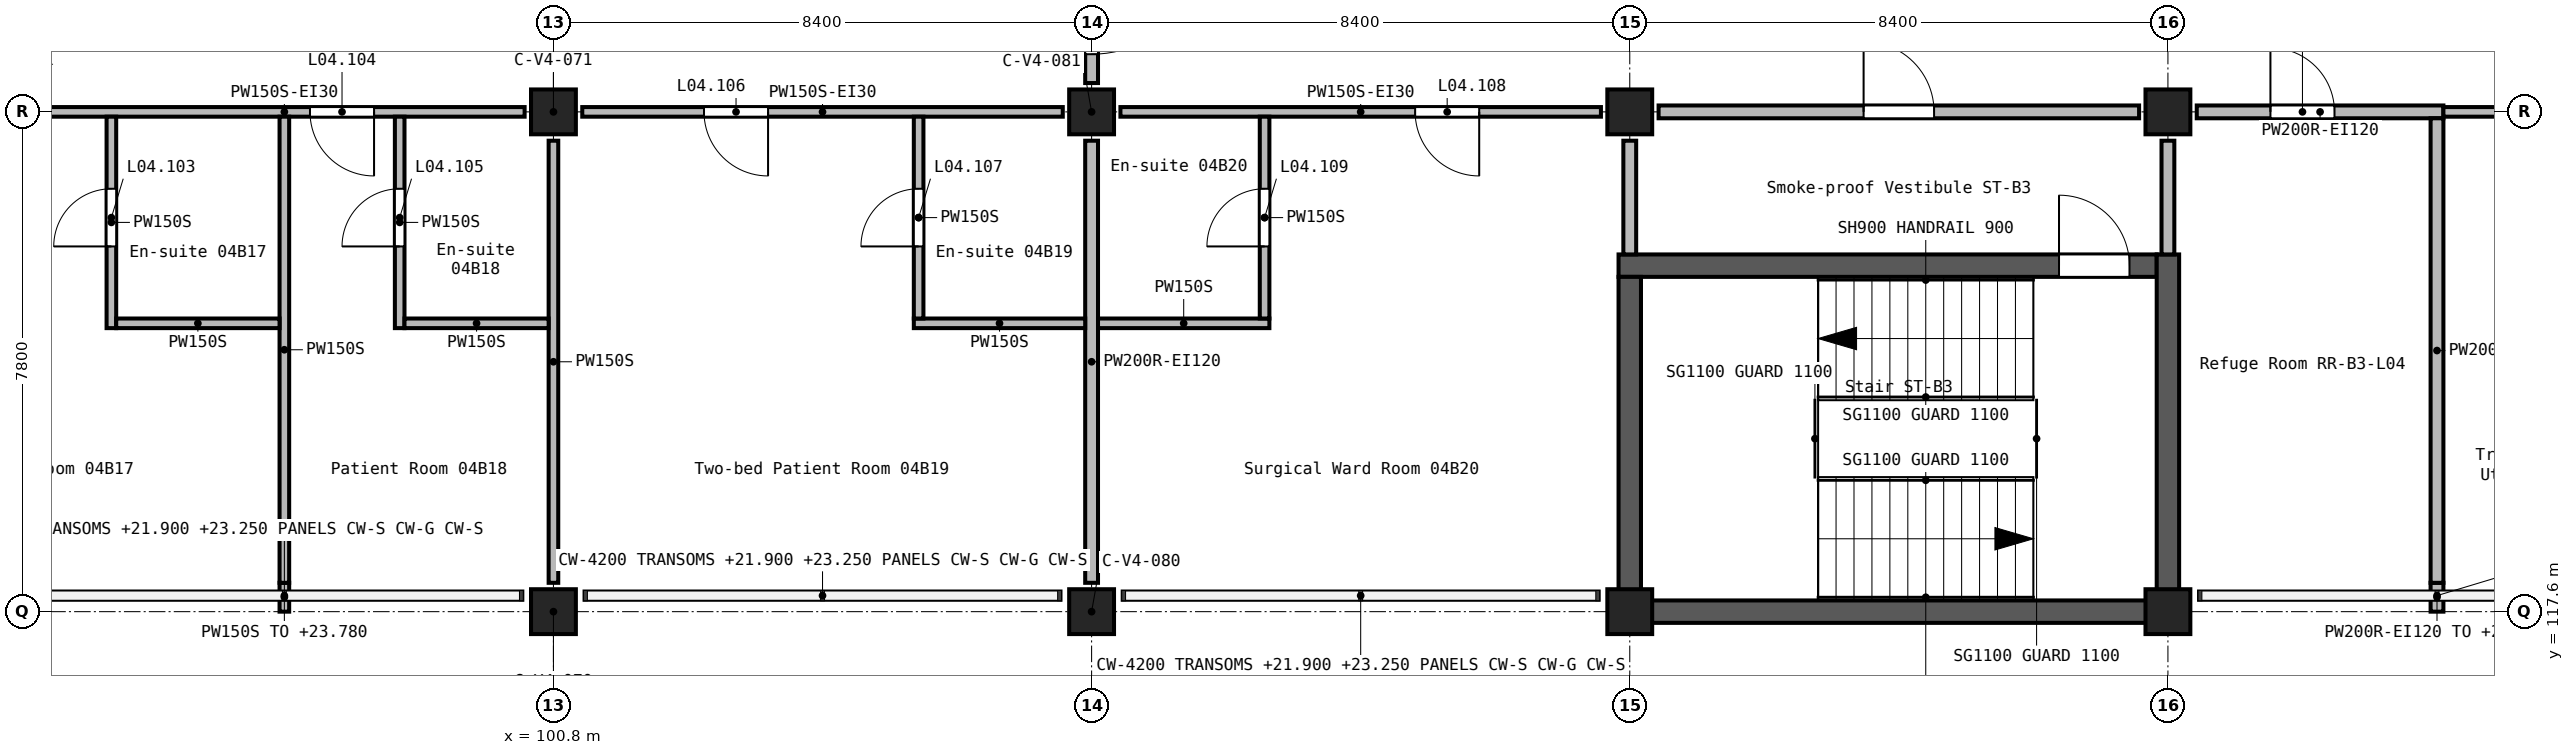
"""IFC4 building model, lengths in metres.
Left out: names, types, materials, properties, quantities, classifications, styles, units other than length and angle.
Written with IfcOpenShell. Run it as: python <this file> out.ifc"""

import sys

from ifc_helpers import new_model, si_unit, direction, frame, frame_2d, origin, origin_2d, place, context, subcontext, project, spatial, rectangle, extrude, element, fill, save


model = new_model("IFC4")
c1 = context("Model", 3, precision=1e-05, world=origin(), true_north=direction((0.0, 1.0)))
c2 = subcontext(c1, "Body", "Model", "MODEL_VIEW")
j1 = project(units=[si_unit("LENGTHUNIT", "METRE"), si_unit("PLANEANGLEUNIT", "RADIAN")], contexts=[c1])
p1 = place(None, origin())
s1 = spatial("IfcSite", under=j1, at=p1, CompositionType="ELEMENT")
p2 = place(p1, origin())
s2 = spatial("IfcBuilding", under=s1, at=p2, CompositionType="ELEMENT")
p3 = place(p2, frame((0.0, 0.0, 21.0)))
s3 = spatial("IfcBuildingStorey", under=s2, at=p3, CompositionType="ELEMENT", Elevation=21.0)
for number, where, z_axis, x_axis in (
    (1, (100.8, 117.6, 0.0), (0.0, 0.0, 1.0), (1.0, 0.0, 0.0)),
    (2, (100.8, 125.4, 0.0), (0.0, 0.0, 1.0), (1.0, 0.0, 0.0)),
    (3, (109.2, 117.6, 0.0), (0.0, 0.0, 1.0), (1.0, 0.0, 0.0)),
    (4, (109.2, 125.4, 0.0), (0.0, 0.0, 1.0), (1.0, 0.0, 0.0)),
    (5, (117.6, 117.6, 0.0), (0.0, 0.0, 1.0), (1.0, 0.0, 0.0)),
    (6, (117.6, 125.4, 0.0), (0.0, 0.0, 1.0), (1.0, 0.0, 0.0)),
    (7, (126.0, 117.6, 0.0), (0.0, 0.0, 1.0), (1.0, 0.0, 0.0)),
    (8, (126.0, 125.4, 0.0), (0.0, 0.0, 1.0), (1.0, 0.0, 0.0)),
):
    element("IfcColumn", number, at=place(p3, frame(where, z_axis=z_axis, x_axis=x_axis)), inside=s3, PredefinedType="COLUMN", context=c2, shape_type="SweptSolid", body=[
        extrude(rectangle(XDim=0.7, YDim=0.7, at=origin_2d()), origin(), (0.0, 0.0, 1.0), 3.9),
    ])
p4 = place(p3, frame((117.425, 123.0, 0.0), z_axis=(0.0, 0.0, 1.0), x_axis=(1.0, 0.0, 0.0)))
e9 = element("IfcWall", 9, at=p4, inside=s3, PredefinedType="SHEAR", context=c2, shape_type="SweptSolid", body=[
    extrude(rectangle(XDim=8.4, YDim=0.35, at=frame_2d((4.2, 0.0))), origin(), (0.0, 0.0, 1.0), 3.9),
])
p5 = place(p4, frame((6.875, 0.0, 0.0)))
e10 = element("IfcOpeningElement", 10, at=p5, cuts=e9, PredefinedType="OPENING", context=c2, shape_type="SweptSolid", body=[
    extrude(rectangle(XDim=1.1, YDim=2.1, at=frame_2d((0.55, 1.05))), frame((0.0, 0.185, 0.0), z_axis=(0.0, -1.0, 0.0), x_axis=(1.0, 0.0, 0.0)), (0.0, 0.0, 1.0), 0.37),
])
p6 = place(p3, frame((117.6, 117.425, 0.0), z_axis=(0.0, 0.0, 1.0), x_axis=(0.0, 1.0, 0.0)))
e11 = element("IfcWall", 11, at=p6, inside=s3, PredefinedType="SHEAR", context=c2, shape_type="SweptSolid", body=[
    extrude(rectangle(XDim=5.4, YDim=0.35, at=frame_2d((2.7, 0.0))), origin(), (0.0, 0.0, 1.0), 3.9),
])
p7 = place(p3, frame((117.775, 117.6, 0.0), z_axis=(0.0, 0.0, 1.0), x_axis=(1.0, 0.0, 0.0)))
e12 = element("IfcWall", 12, at=p7, inside=s3, PredefinedType="SHEAR", context=c2, shape_type="SweptSolid", body=[
    extrude(rectangle(XDim=8.05, YDim=0.35, at=frame_2d((4.025, 0.0))), origin(), (0.0, 0.0, 1.0), 3.9),
])
p8 = place(p3, frame((126.0, 117.425, 0.0), z_axis=(0.0, 0.0, 1.0), x_axis=(0.0, 1.0, 0.0)))
e13 = element("IfcWall", 13, at=p8, inside=s3, PredefinedType="SHEAR", context=c2, shape_type="SweptSolid", body=[
    extrude(rectangle(XDim=5.75, YDim=0.35, at=frame_2d((2.875, 0.0))), origin(), (0.0, 0.0, 1.0), 3.9),
])
p9 = place(p3, frame((109.2, 128.55, 0.0), z_axis=(0.0, 0.0, 1.0), x_axis=(0.0, -1.0, 0.0)))
e14 = element("IfcWall", 14, at=p9, inside=s3, PredefinedType="SOLIDWALL", context=c2, shape_type="SweptSolid", body=[
    extrude(rectangle(XDim=2.7, YDim=0.2, at=frame_2d((1.35, 0.0))), origin(), (0.0, 0.0, 1.0), 3.6),
])
p10 = place(p9, frame((0.45, 0.0, 0.0)))
e15 = element("IfcOpeningElement", 15, at=p10, cuts=e14, PredefinedType="OPENING", context=c2, shape_type="SweptSolid", body=[
    extrude(rectangle(XDim=1.8, YDim=2.1, at=frame_2d((0.9, 1.05))), frame((0.0, 0.11, 0.0), z_axis=(0.0, -1.0, 0.0), x_axis=(1.0, 0.0, 0.0)), (0.0, 0.0, 1.0), 0.22),
])
p11 = place(p3, frame((109.2, 124.95, 0.0), z_axis=(0.0, 0.0, 1.0), x_axis=(0.0, -1.0, 0.0)))
e16 = element("IfcWall", 16, at=p11, inside=s3, PredefinedType="SOLIDWALL", context=c2, shape_type="SweptSolid", body=[
    extrude(rectangle(XDim=6.9, YDim=0.2, at=frame_2d((3.45, 0.0))), origin(), (0.0, 0.0, 1.0), 3.6),
])
p12 = place(p3, frame((118.05, 125.4, 0.0), z_axis=(0.0, 0.0, 1.0), x_axis=(1.0, 0.0, 0.0)))
e17 = element("IfcWall", 17, at=p12, inside=s3, PredefinedType="SOLIDWALL", context=c2, shape_type="SweptSolid", body=[
    extrude(rectangle(XDim=7.5, YDim=0.2, at=frame_2d((3.75, 0.0))), origin(), (0.0, 0.0, 1.0), 3.6),
])
p13 = place(p12, frame((3.2, 0.0, 0.0)))
e18 = element("IfcOpeningElement", 18, at=p13, cuts=e17, PredefinedType="OPENING", context=c2, shape_type="SweptSolid", body=[
    extrude(rectangle(XDim=1.1, YDim=2.1, at=frame_2d((0.55, 1.05))), frame((0.0, 0.11, 0.0), z_axis=(0.0, -1.0, 0.0), x_axis=(1.0, 0.0, 0.0)), (0.0, 0.0, 1.0), 0.22),
])
p14 = place(p3, frame((126.45, 125.4, 0.0), z_axis=(0.0, 0.0, 1.0), x_axis=(1.0, 0.0, 0.0)))
e19 = element("IfcWall", 19, at=p14, inside=s3, PredefinedType="SOLIDWALL", context=c2, shape_type="SweptSolid", body=[
    extrude(rectangle(XDim=3.85, YDim=0.2, at=frame_2d((1.925, 0.0))), origin(), (0.0, 0.0, 1.0), 3.6),
])
p15 = place(p14, frame((1.15, 0.0, 0.0)))
e20 = element("IfcOpeningElement", 20, at=p15, cuts=e19, PredefinedType="OPENING", context=c2, shape_type="SweptSolid", body=[
    extrude(rectangle(XDim=1.0, YDim=2.1, at=frame_2d((0.5, 1.05))), frame((0.0, 0.11, 0.0), z_axis=(0.0, -1.0, 0.0), x_axis=(1.0, 0.0, 0.0)), (0.0, 0.0, 1.0), 0.22),
])
p16 = place(p3, frame((126.0, 123.175, 0.0), z_axis=(0.0, 0.0, 1.0), x_axis=(0.0, 1.0, 0.0)))
e21 = element("IfcWall", 21, at=p16, inside=s3, PredefinedType="SOLIDWALL", context=c2, shape_type="SweptSolid", body=[
    extrude(rectangle(XDim=1.775, YDim=0.2, at=frame_2d((0.887, 0.0))), origin(), (0.0, 0.0, 1.0), 3.6),
])
p17 = place(p3, frame((130.2, 117.6, 0.0), z_axis=(0.0, 0.0, 1.0), x_axis=(0.0, 1.0, 0.0)))
e22 = element("IfcWall", 22, at=p17, inside=s3, PredefinedType="SOLIDWALL", context=c2, shape_type="SweptSolid", body=[
    extrude(rectangle(XDim=0.45, YDim=0.2, at=frame_2d((0.225, 0.0))), origin(), (0.0, 0.0, 1.0), 2.78),
])
p18 = place(p3, frame((130.2, 118.05, 0.0), z_axis=(0.0, 0.0, 1.0), x_axis=(0.0, 1.0, 0.0)))
e23 = element("IfcWall", 23, at=p18, inside=s3, PredefinedType="SOLIDWALL", context=c2, shape_type="SweptSolid", body=[
    extrude(rectangle(XDim=7.25, YDim=0.2, at=frame_2d((3.625, 0.0))), origin(), (0.0, 0.0, 1.0), 3.6),
])
p19 = place(p3, frame((117.6, 123.175, 0.0), z_axis=(0.0, 0.0, 1.0), x_axis=(0.0, 1.0, 0.0)))
e24 = element("IfcWall", 24, at=p19, inside=s3, PredefinedType="SOLIDWALL", context=c2, shape_type="SweptSolid", body=[
    extrude(rectangle(XDim=1.775, YDim=0.2, at=frame_2d((0.887, 0.0))), origin(), (0.0, 0.0, 1.0), 3.6),
])
p20 = place(p3, frame((117.15, 125.4, 0.0), z_axis=(0.0, 0.0, 1.0), x_axis=(-1.0, 0.0, 0.0)))
e25 = element("IfcWall", 25, at=p20, inside=s3, PredefinedType="PARTITIONING", context=c2, shape_type="SweptSolid", body=[
    extrude(rectangle(XDim=7.5, YDim=0.15, at=frame_2d((3.75, 0.0))), origin(), (0.0, 0.0, 1.0), 3.6),
])
p21 = place(p20, frame((1.9, 0.0, 0.0)))
e26 = element("IfcOpeningElement", 26, at=p21, cuts=e25, PredefinedType="OPENING", context=c2, shape_type="SweptSolid", body=[
    extrude(rectangle(XDim=1.0, YDim=2.1, at=frame_2d((0.5, 1.05))), frame((0.0, 0.085, 0.0), z_axis=(0.0, -1.0, 0.0), x_axis=(1.0, 0.0, 0.0)), (0.0, 0.0, 1.0), 0.17),
])
p22 = place(p3, frame((108.75, 125.4, 0.0), z_axis=(0.0, 0.0, 1.0), x_axis=(-1.0, 0.0, 0.0)))
e27 = element("IfcWall", 27, at=p22, inside=s3, PredefinedType="PARTITIONING", context=c2, shape_type="SweptSolid", body=[
    extrude(rectangle(XDim=7.5, YDim=0.15, at=frame_2d((3.75, 0.0))), origin(), (0.0, 0.0, 1.0), 3.6),
])
p23 = place(p22, frame((4.6, 0.0, 0.0)))
e28 = element("IfcOpeningElement", 28, at=p23, cuts=e27, PredefinedType="OPENING", context=c2, shape_type="SweptSolid", body=[
    extrude(rectangle(XDim=1.0, YDim=2.1, at=frame_2d((0.5, 1.05))), frame((0.0, 0.085, 0.0), z_axis=(0.0, -1.0, 0.0), x_axis=(1.0, 0.0, 0.0)), (0.0, 0.0, 1.0), 0.17),
])
p24 = place(p3, frame((100.35, 125.4, 0.0), z_axis=(0.0, 0.0, 1.0), x_axis=(-1.0, 0.0, 0.0)))
e29 = element("IfcWall", 29, at=p24, inside=s3, PredefinedType="PARTITIONING", context=c2, shape_type="SweptSolid", body=[
    extrude(rectangle(XDim=7.5, YDim=0.15, at=frame_2d((3.75, 0.0))), origin(), (0.0, 0.0, 1.0), 3.6),
])
p25 = place(p24, frame((2.35, 0.0, 0.0)))
e30 = element("IfcOpeningElement", 30, at=p25, cuts=e29, PredefinedType="OPENING", context=c2, shape_type="SweptSolid", body=[
    extrude(rectangle(XDim=1.0, YDim=2.1, at=frame_2d((0.5, 1.05))), frame((0.0, 0.085, 0.0), z_axis=(0.0, -1.0, 0.0), x_axis=(1.0, 0.0, 0.0)), (0.0, 0.0, 1.0), 0.17),
])
p26 = place(p3, frame((130.3, 125.4, 0.0), z_axis=(0.0, 0.0, 1.0), x_axis=(1.0, 0.0, 0.0)))
e31 = element("IfcWall", 31, at=p26, inside=s3, PredefinedType="PARTITIONING", context=c2, shape_type="SweptSolid", body=[
    extrude(rectangle(XDim=3.65, YDim=0.15, at=frame_2d((1.825, 0.0))), origin(), (0.0, 0.0, 1.0), 3.6),
])
p27 = place(p26, frame((1.5, 0.0, 0.0)))
e32 = element("IfcOpeningElement", 32, at=p27, cuts=e31, PredefinedType="OPENING", context=c2, shape_type="SweptSolid", body=[
    extrude(rectangle(XDim=1.0, YDim=2.1, at=frame_2d((0.5, 1.05))), frame((0.0, 0.085, 0.0), z_axis=(0.0, -1.0, 0.0), x_axis=(1.0, 0.0, 0.0)), (0.0, 0.0, 1.0), 0.17),
])
p28 = place(p3, frame((96.6, 117.6, 0.0), z_axis=(0.0, 0.0, 1.0), x_axis=(0.0, 1.0, 0.0)))
e33 = element("IfcWall", 33, at=p28, inside=s3, PredefinedType="PARTITIONING", context=c2, shape_type="SweptSolid", body=[
    extrude(rectangle(XDim=0.45, YDim=0.15, at=frame_2d((0.225, 0.0))), origin(), (0.0, 0.0, 1.0), 2.78),
])
p29 = place(p3, frame((96.6, 118.05, 0.0), z_axis=(0.0, 0.0, 1.0), x_axis=(0.0, 1.0, 0.0)))
e34 = element("IfcWall", 34, at=p29, inside=s3, PredefinedType="PARTITIONING", context=c2, shape_type="SweptSolid", body=[
    extrude(rectangle(XDim=7.275, YDim=0.15, at=frame_2d((3.637, 0.0))), origin(), (0.0, 0.0, 1.0), 3.6),
])
p30 = place(p3, frame((100.8, 118.05, 0.0), z_axis=(0.0, 0.0, 1.0), x_axis=(0.0, 1.0, 0.0)))
e35 = element("IfcWall", 35, at=p30, inside=s3, PredefinedType="PARTITIONING", context=c2, shape_type="SweptSolid", body=[
    extrude(rectangle(XDim=6.9, YDim=0.15, at=frame_2d((3.45, 0.0))), origin(), (0.0, 0.0, 1.0), 3.6),
])
for number, where, z_axis, x_axis in (
    (36, (106.425, 122.1, 0.0), (0.0, 0.0, 1.0), (1.0, 0.0, 0.0)),
    (37, (109.3, 122.1, 0.0), (0.0, 0.0, 1.0), (1.0, 0.0, 0.0)),
):
    element("IfcWall", number, at=place(p3, frame(where, z_axis=z_axis, x_axis=x_axis)), inside=s3, PredefinedType="PARTITIONING", context=c2, shape_type="SweptSolid", body=[
        extrude(rectangle(XDim=2.675, YDim=0.15, at=frame_2d((1.337, 0.0))), origin(), (0.0, 0.0, 1.0), 3.6),
    ])
p31 = place(p3, frame((93.9, 122.025, 0.0), z_axis=(0.0, 0.0, 1.0), x_axis=(0.0, 1.0, 0.0)))
e38 = element("IfcWall", 38, at=p31, inside=s3, PredefinedType="PARTITIONING", context=c2, shape_type="SweptSolid", body=[
    extrude(rectangle(XDim=3.3, YDim=0.15, at=frame_2d((1.65, 0.0))), origin(), (0.0, 0.0, 1.0), 3.6),
])
p32 = place(p31, frame((1.275, 0.0, 0.0)))
e39 = element("IfcOpeningElement", 39, at=p32, cuts=e38, PredefinedType="OPENING", context=c2, shape_type="SweptSolid", body=[
    extrude(rectangle(XDim=0.9, YDim=2.1, at=frame_2d((0.45, 1.05))), frame((0.0, 0.085, 0.0), z_axis=(0.0, -1.0, 0.0), x_axis=(1.0, 0.0, 0.0)), (0.0, 0.0, 1.0), 0.17),
])
p33 = place(p3, frame((98.4, 122.025, 0.0), z_axis=(0.0, 0.0, 1.0), x_axis=(0.0, 1.0, 0.0)))
e40 = element("IfcWall", 40, at=p33, inside=s3, PredefinedType="PARTITIONING", context=c2, shape_type="SweptSolid", body=[
    extrude(rectangle(XDim=3.3, YDim=0.15, at=frame_2d((1.65, 0.0))), origin(), (0.0, 0.0, 1.0), 3.6),
])
p34 = place(p33, frame((1.275, 0.0, 0.0)))
e41 = element("IfcOpeningElement", 41, at=p34, cuts=e40, PredefinedType="OPENING", context=c2, shape_type="SweptSolid", body=[
    extrude(rectangle(XDim=0.9, YDim=2.1, at=frame_2d((0.45, 1.05))), frame((0.0, 0.085, 0.0), z_axis=(0.0, -1.0, 0.0), x_axis=(1.0, 0.0, 0.0)), (0.0, 0.0, 1.0), 0.17),
])
p35 = place(p3, frame((106.5, 122.175, 0.0), z_axis=(0.0, 0.0, 1.0), x_axis=(0.0, 1.0, 0.0)))
e42 = element("IfcWall", 42, at=p35, inside=s3, PredefinedType="PARTITIONING", context=c2, shape_type="SweptSolid", body=[
    extrude(rectangle(XDim=3.15, YDim=0.15, at=frame_2d((1.575, 0.0))), origin(), (0.0, 0.0, 1.0), 3.6),
])
p36 = place(p35, frame((1.125, 0.0, 0.0)))
e43 = element("IfcOpeningElement", 43, at=p36, cuts=e42, PredefinedType="OPENING", context=c2, shape_type="SweptSolid", body=[
    extrude(rectangle(XDim=0.9, YDim=2.1, at=frame_2d((0.45, 1.05))), frame((0.0, 0.085, 0.0), z_axis=(0.0, -1.0, 0.0), x_axis=(1.0, 0.0, 0.0)), (0.0, 0.0, 1.0), 0.17),
])
p37 = place(p3, frame((111.9, 122.175, 0.0), z_axis=(0.0, 0.0, 1.0), x_axis=(0.0, 1.0, 0.0)))
e44 = element("IfcWall", 44, at=p37, inside=s3, PredefinedType="PARTITIONING", context=c2, shape_type="SweptSolid", body=[
    extrude(rectangle(XDim=3.15, YDim=0.15, at=frame_2d((1.575, 0.0))), origin(), (0.0, 0.0, 1.0), 3.6),
])
p38 = place(p37, frame((1.125, 0.0, 0.0)))
e45 = element("IfcOpeningElement", 45, at=p38, cuts=e44, PredefinedType="OPENING", context=c2, shape_type="SweptSolid", body=[
    extrude(rectangle(XDim=0.9, YDim=2.1, at=frame_2d((0.45, 1.05))), frame((0.0, 0.085, 0.0), z_axis=(0.0, -1.0, 0.0), x_axis=(1.0, 0.0, 0.0)), (0.0, 0.0, 1.0), 0.17),
])
p39 = place(p3, frame((93.975, 122.1, 0.0), z_axis=(0.0, 0.0, 1.0), x_axis=(1.0, 0.0, 0.0)))
e46 = element("IfcWall", 46, at=p39, inside=s3, PredefinedType="PARTITIONING", context=c2, shape_type="SweptSolid", body=[
    extrude(rectangle(XDim=2.55, YDim=0.15, at=frame_2d((1.275, 0.0))), origin(), (0.0, 0.0, 1.0), 3.6),
])
p40 = place(p3, frame((98.475, 122.1, 0.0), z_axis=(0.0, 0.0, 1.0), x_axis=(1.0, 0.0, 0.0)))
e47 = element("IfcWall", 47, at=p40, inside=s3, PredefinedType="PARTITIONING", context=c2, shape_type="SweptSolid", body=[
    extrude(rectangle(XDim=2.25, YDim=0.15, at=frame_2d((1.125, 0.0))), origin(), (0.0, 0.0, 1.0), 3.6),
])
p41 = place(p10, origin())
e48 = element("IfcDoor", 48, at=p41, inside=s3, OperationType="DOUBLE_DOOR_SINGLE_SWING", PredefinedType="DOOR", context=c2, shape_type="SweptSolid", body=[
    extrude(rectangle(XDim=1.8, YDim=2.1, at=frame_2d((0.9, 1.05))), frame((0.0, 0.025, 0.0), z_axis=(0.0, -1.0, 0.0), x_axis=(1.0, 0.0, 0.0)), (0.0, 0.0, 1.0), 0.05),
])
fill(e15, e48)
p42 = place(p32, frame((0.9, 0.0, 0.0), z_axis=(0.0, 0.0, 1.0), x_axis=(-1.0, 0.0, 0.0)))
e49 = element("IfcDoor", 49, at=p42, inside=s3, OperationType="SINGLE_SWING_LEFT", PredefinedType="DOOR", context=c2, shape_type="SweptSolid", body=[
    extrude(rectangle(XDim=0.9, YDim=2.1, at=frame_2d((0.45, 1.05))), frame((0.0, 0.025, 0.0), z_axis=(0.0, -1.0, 0.0), x_axis=(1.0, 0.0, 0.0)), (0.0, 0.0, 1.0), 0.05),
])
fill(e39, e49)
p43 = place(p25, origin())
e50 = element("IfcDoor", 50, at=p43, inside=s3, OperationType="SINGLE_SWING_LEFT", PredefinedType="DOOR", context=c2, shape_type="SweptSolid", body=[
    extrude(rectangle(XDim=1.0, YDim=2.1, at=frame_2d((0.5, 1.05))), frame((0.0, 0.025, 0.0), z_axis=(0.0, -1.0, 0.0), x_axis=(1.0, 0.0, 0.0)), (0.0, 0.0, 1.0), 0.05),
])
fill(e30, e50)
p44 = place(p34, frame((0.9, 0.0, 0.0), z_axis=(0.0, 0.0, 1.0), x_axis=(-1.0, 0.0, 0.0)))
e51 = element("IfcDoor", 51, at=p44, inside=s3, OperationType="SINGLE_SWING_LEFT", PredefinedType="DOOR", context=c2, shape_type="SweptSolid", body=[
    extrude(rectangle(XDim=0.9, YDim=2.1, at=frame_2d((0.45, 1.05))), frame((0.0, 0.025, 0.0), z_axis=(0.0, -1.0, 0.0), x_axis=(1.0, 0.0, 0.0)), (0.0, 0.0, 1.0), 0.05),
])
fill(e41, e51)
p45 = place(p23, origin())
e52 = element("IfcDoor", 52, at=p45, inside=s3, OperationType="SINGLE_SWING_RIGHT", PredefinedType="DOOR", context=c2, shape_type="SweptSolid", body=[
    extrude(rectangle(XDim=1.0, YDim=2.1, at=frame_2d((0.5, 1.05))), frame((0.0, 0.025, 0.0), z_axis=(0.0, -1.0, 0.0), x_axis=(1.0, 0.0, 0.0)), (0.0, 0.0, 1.0), 0.05),
])
fill(e28, e52)
p46 = place(p36, frame((0.9, 0.0, 0.0), z_axis=(0.0, 0.0, 1.0), x_axis=(-1.0, 0.0, 0.0)))
e53 = element("IfcDoor", 53, at=p46, inside=s3, OperationType="SINGLE_SWING_LEFT", PredefinedType="DOOR", context=c2, shape_type="SweptSolid", body=[
    extrude(rectangle(XDim=0.9, YDim=2.1, at=frame_2d((0.45, 1.05))), frame((0.0, 0.025, 0.0), z_axis=(0.0, -1.0, 0.0), x_axis=(1.0, 0.0, 0.0)), (0.0, 0.0, 1.0), 0.05),
])
fill(e43, e53)
p47 = place(p21, origin())
e54 = element("IfcDoor", 54, at=p47, inside=s3, OperationType="SINGLE_SWING_LEFT", PredefinedType="DOOR", context=c2, shape_type="SweptSolid", body=[
    extrude(rectangle(XDim=1.0, YDim=2.1, at=frame_2d((0.5, 1.05))), frame((0.0, 0.025, 0.0), z_axis=(0.0, -1.0, 0.0), x_axis=(1.0, 0.0, 0.0)), (0.0, 0.0, 1.0), 0.05),
])
fill(e26, e54)
p48 = place(p38, origin())
e55 = element("IfcDoor", 55, at=p48, inside=s3, OperationType="SINGLE_SWING_RIGHT", PredefinedType="DOOR", context=c2, shape_type="SweptSolid", body=[
    extrude(rectangle(XDim=0.9, YDim=2.1, at=frame_2d((0.45, 1.05))), frame((0.0, 0.025, 0.0), z_axis=(0.0, -1.0, 0.0), x_axis=(1.0, 0.0, 0.0)), (0.0, 0.0, 1.0), 0.05),
])
fill(e45, e55)
p49 = place(p15, frame((1.0, 0.0, 0.0), z_axis=(0.0, 0.0, 1.0), x_axis=(-1.0, 0.0, 0.0)))
e56 = element("IfcDoor", 56, at=p49, inside=s3, OperationType="SINGLE_SWING_RIGHT", PredefinedType="DOOR", context=c2, shape_type="SweptSolid", body=[
    extrude(rectangle(XDim=1.0, YDim=2.1, at=frame_2d((0.5, 1.05))), frame((0.0, 0.025, 0.0), z_axis=(0.0, -1.0, 0.0), x_axis=(1.0, 0.0, 0.0)), (0.0, 0.0, 1.0), 0.05),
])
fill(e20, e56)
p50 = place(p5, frame((1.1, 0.0, 0.0), z_axis=(0.0, 0.0, 1.0), x_axis=(-1.0, 0.0, 0.0)))
e57 = element("IfcDoor", 57, at=p50, inside=s3, OperationType="SINGLE_SWING_LEFT", PredefinedType="DOOR", context=c2, shape_type="SweptSolid", body=[
    extrude(rectangle(XDim=1.1, YDim=2.1, at=frame_2d((0.55, 1.05))), frame((0.0, 0.025, 0.0), z_axis=(0.0, -1.0, 0.0), x_axis=(1.0, 0.0, 0.0)), (0.0, 0.0, 1.0), 0.05),
])
fill(e10, e57)
p51 = place(p13, frame((1.1, 0.0, 0.0), z_axis=(0.0, 0.0, 1.0), x_axis=(-1.0, 0.0, 0.0)))
e58 = element("IfcDoor", 58, at=p51, inside=s3, OperationType="SINGLE_SWING_LEFT", PredefinedType="DOOR", context=c2, shape_type="SweptSolid", body=[
    extrude(rectangle(XDim=1.1, YDim=2.1, at=frame_2d((0.55, 1.05))), frame((0.0, 0.025, 0.0), z_axis=(0.0, -1.0, 0.0), x_axis=(1.0, 0.0, 0.0)), (0.0, 0.0, 1.0), 0.05),
])
fill(e18, e58)
save(model, sys.argv[1])
